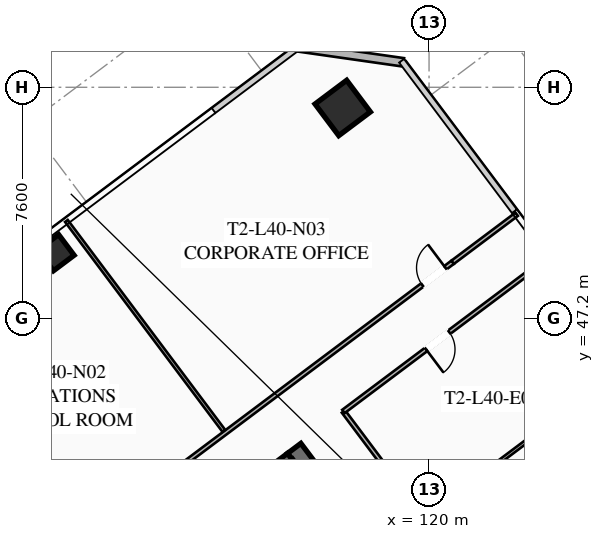
"""IFC4 building model, lengths in metres.
Left out: names, types, materials, properties, quantities, classifications, styles, units other than length and angle.
Written with IfcOpenShell. Run it as: python <this file> out.ifc"""

import sys

from ifc_helpers import new_model, si_unit, direction, frame, frame_2d, origin, origin_2d, place, context, subcontext, project, spatial, rectangle, hollow_rectangle, extrude, element, fill, save


model = new_model("IFC4")
c1 = context("Model", 3, precision=1e-05, world=origin(), true_north=direction((0.0, 1.0)))
c2 = subcontext(c1, "Body", "Model", "MODEL_VIEW")
j1 = project(units=[si_unit("LENGTHUNIT", "METRE"), si_unit("PLANEANGLEUNIT", "RADIAN")], contexts=[c1])
p1 = place(None, origin())
s1 = spatial("IfcSite", under=j1, at=p1, CompositionType="ELEMENT")
p2 = place(p1, origin())
s2 = spatial("IfcBuilding", under=s1, at=p2, CompositionType="ELEMENT")
p3 = place(p2, frame((0.0, 0.0, 149.9)))
s3 = spatial("IfcBuildingStorey", under=s2, at=p3, CompositionType="ELEMENT", Elevation=149.9)
p4 = place(p3, frame((115.564, 42.923, 0.0), z_axis=(0.0, 0.0, 1.0), x_axis=(0.600005007985, -0.799996243986, 0.0)))
e1 = element("IfcWall", 1, at=p4, inside=s3, PredefinedType="SHEAR", context=c2, shape_type="SweptSolid", body=[
    extrude(rectangle(XDim=15.6, YDim=0.55, at=frame_2d((7.8, 0.0))), origin(), (0.0, 0.0, 1.0), 3.55),
])
p5 = place(p3, frame((103.461, 33.502, 0.0), z_axis=(0.0, 0.0, 1.0), x_axis=(0.799998054672, 0.600002593761, 0.0)))
e2 = element("IfcWall", 2, at=p5, inside=s3, PredefinedType="SHEAR", context=c2, shape_type="SweptSolid", body=[
    extrude(rectangle(XDim=15.06, YDim=0.55, at=frame_2d((7.53, 0.0))), origin(), (0.0, 0.0, 1.0), 3.55),
])
p6 = place(p5, frame((4.58, 0.0, 0.0)))
e3 = element("IfcOpeningElement", 3, at=p6, cuts=e2, PredefinedType="OPENING", context=c2, shape_type="SweptSolid", body=[
    extrude(rectangle(XDim=1.25, YDim=2.25, at=frame_2d((0.625, 1.125))), frame((0.0, 0.285, 0.0), z_axis=(0.0, -1.0, 0.0), x_axis=(1.0, 0.0, 0.0)), (0.0, 0.0, 1.0), 0.57),
])
p7 = place(p5, frame((9.63, 0.0, 0.0)))
e4 = element("IfcOpeningElement", 4, at=p7, cuts=e2, PredefinedType="OPENING", context=c2, shape_type="SweptSolid", body=[
    extrude(rectangle(XDim=1.25, YDim=2.25, at=frame_2d((0.625, 1.125))), frame((0.0, 0.285, 0.0), z_axis=(0.0, -1.0, 0.0), x_axis=(1.0, 0.0, 0.0)), (0.0, 0.0, 1.0), 0.57),
])
p8 = place(p3, frame((115.41, 41.87, 0.0), z_axis=(0.0, 0.0, 1.0), x_axis=(0.799999996291, 0.600000004945, 0.0)))
e5 = element("IfcColumn", 5, at=p8, inside=s3, PredefinedType="COLUMN", context=c2, shape_type="SweptSolid", body=[
    extrude(hollow_rectangle(XDim=1.0, YDim=1.0, WallThickness=0.04, at=origin_2d()), origin(), (0.0, 0.0, 1.0), 3.37),
])
p9 = place(p3, frame((117.16, 54.12, 0.0), z_axis=(0.0, 0.0, 1.0), x_axis=(0.799999996291, 0.600000004945, 0.0)))
e6 = element("IfcColumn", 6, at=p9, inside=s3, PredefinedType="COLUMN", context=c2, shape_type="SweptSolid", body=[
    extrude(hollow_rectangle(XDim=1.3, YDim=1.3, WallThickness=0.05, at=origin_2d()), origin(), (0.0, 0.0, 1.0), 3.37),
])
p10 = place(p3, frame((107.73, 49.36, 0.0), z_axis=(0.0, 0.0, 1.0), x_axis=(0.799999996291, 0.600000004945, 0.0)))
e7 = element("IfcColumn", 7, at=p10, inside=s3, PredefinedType="COLUMN", context=c2, shape_type="SweptSolid", body=[
    extrude(hollow_rectangle(XDim=0.85, YDim=0.85, WallThickness=0.035, at=origin_2d()), origin(), (0.0, 0.0, 1.0), 3.37),
])
p11 = place(p3, frame((115.66, 56.12, 0.0), z_axis=(0.0, 0.0, 1.0), x_axis=(0.989949493661, -0.141421356237, 0.0)))
e8 = element("IfcWall", 8, at=p11, inside=s3, PredefinedType="SOLIDWALL", context=c2, shape_type="SweptSolid", body=[
    extrude(rectangle(XDim=3.536, YDim=0.28, at=frame_2d((1.768, 0.0))), origin(), (0.0, 0.0, 1.0), 3.37),
])
p12 = place(p3, frame((119.824, 40.618, 0.0), z_axis=(0.0, 0.0, 1.0), x_axis=(-0.599982243973, 0.800013316712, 0.0)))
e9 = element("IfcWall", 9, at=p12, inside=s3, PredefinedType="PARTITIONING", context=c2, shape_type="SweptSolid", body=[
    extrude(rectangle(XDim=4.4, YDim=0.135, at=frame_2d((2.2, 0.0))), origin(), (0.0, 0.0, 1.0), 2.723),
])
p13 = place(p3, frame((95.738, 30.266, 0.0), z_axis=(0.0, 0.0, 1.0), x_axis=(0.800003744006, 0.59999500796, 0.0)))
e10 = element("IfcWall", 10, at=p13, inside=s3, PredefinedType="PARTITIONING", context=c2, shape_type="SweptSolid", body=[
    extrude(rectangle(XDim=31.3, YDim=0.135, at=frame_2d((15.65, 0.0))), origin(), (0.0, 0.0, 1.0), 2.723),
])
p14 = place(p13, frame((0.3, 0.0, 0.0)))
e11 = element("IfcOpeningElement", 11, at=p14, cuts=e10, PredefinedType="OPENING", context=c2, shape_type="SweptSolid", body=[
    extrude(rectangle(XDim=0.95, YDim=2.05, at=frame_2d((0.475, 1.025))), frame((0.0, 0.077, 0.0), z_axis=(0.0, -1.0, 0.0), x_axis=(1.0, 0.0, 0.0)), (0.0, 0.0, 1.0), 0.155),
])
p15 = place(p13, frame((15.493, 0.0, 0.0)))
e12 = element("IfcOpeningElement", 12, at=p15, cuts=e10, PredefinedType="OPENING", context=c2, shape_type="SweptSolid", body=[
    extrude(rectangle(XDim=0.95, YDim=2.05, at=frame_2d((0.475, 1.025))), frame((0.0, 0.077, 0.0), z_axis=(0.0, -1.0, 0.0), x_axis=(1.0, 0.0, 0.0)), (0.0, 0.0, 1.0), 0.155),
])
p16 = place(p13, frame((30.05, 0.0, 0.0)))
e13 = element("IfcOpeningElement", 13, at=p16, cuts=e10, PredefinedType="OPENING", context=c2, shape_type="SweptSolid", body=[
    extrude(rectangle(XDim=0.95, YDim=2.05, at=frame_2d((0.475, 1.025))), frame((0.0, 0.077, 0.0), z_axis=(0.0, -1.0, 0.0), x_axis=(1.0, 0.0, 0.0)), (0.0, 0.0, 1.0), 0.155),
])
p17 = place(p3, frame((120.778, 49.046, 0.0), z_axis=(0.0, 0.0, 1.0), x_axis=(0.799977721118, 0.600029704027, 0.0)))
e14 = element("IfcWall", 14, at=p17, inside=s3, PredefinedType="PARTITIONING", context=c2, shape_type="SweptSolid", body=[
    extrude(rectangle(XDim=2.63, YDim=0.135, at=frame_2d((1.315, 0.0))), origin(), (0.0, 0.0, 1.0), 2.723),
])
p18 = place(p3, frame((113.25, 43.5, 0.0), z_axis=(0.0, 0.0, 1.0), x_axis=(-0.599995473644, 0.800003394747, 0.0)))
e15 = element("IfcWall", 15, at=p18, inside=s3, PredefinedType="PARTITIONING", context=c2, shape_type="SweptSolid", body=[
    extrude(rectangle(XDim=8.63, YDim=0.11, at=frame_2d((4.315, 0.0))), origin(), (0.0, 0.0, 1.0), 2.723),
])
p19 = place(p3, frame((123.824, 49.118, 0.0), z_axis=(0.0, 0.0, 1.0), x_axis=(-0.799996470201, -0.60000470637, 0.0)))
e16 = element("IfcWall", 16, at=p19, inside=s3, PredefinedType="PARTITIONING", context=c2, shape_type="SweptSolid", body=[
    extrude(rectangle(XDim=8.3, YDim=0.135, at=frame_2d((4.15, 0.0))), origin(), (0.0, 0.0, 1.0), 2.723),
])
p20 = place(p19, frame((3.95, 0.0, 0.0)))
e17 = element("IfcOpeningElement", 17, at=p20, cuts=e16, PredefinedType="OPENING", context=c2, shape_type="SweptSolid", body=[
    extrude(rectangle(XDim=0.95, YDim=2.05, at=frame_2d((0.475, 1.025))), frame((0.0, 0.077, 0.0), z_axis=(0.0, -1.0, 0.0), x_axis=(1.0, 0.0, 0.0)), (0.0, 0.0, 1.0), 0.155),
])
p21 = place(p3, frame((126.464, 45.598, 0.0), z_axis=(0.0, 0.0, 1.0), x_axis=(-0.8000181681, -0.599975775102, 0.0)))
e18 = element("IfcWall", 18, at=p21, inside=s3, PredefinedType="PARTITIONING", context=c2, shape_type="SweptSolid", body=[
    extrude(rectangle(XDim=6.45, YDim=0.11, at=frame_2d((3.225, 0.0))), origin(), (0.0, 0.0, 1.0), 2.723),
])
p22 = place(p16, origin())
e19 = element("IfcDoor", 19, at=p22, inside=s3, OperationType="SINGLE_SWING_RIGHT", PredefinedType="DOOR", context=c2, shape_type="SweptSolid", body=[
    extrude(rectangle(XDim=0.95, YDim=2.05, at=frame_2d((0.475, 1.025))), frame((0.0, 0.025, 0.0), z_axis=(0.0, -1.0, 0.0), x_axis=(1.0, 0.0, 0.0)), (0.0, 0.0, 1.0), 0.05),
])
fill(e13, e19)
p23 = place(p20, origin())
e20 = element("IfcDoor", 20, at=p23, inside=s3, OperationType="SINGLE_SWING_RIGHT", PredefinedType="DOOR", context=c2, shape_type="SweptSolid", body=[
    extrude(rectangle(XDim=0.95, YDim=2.05, at=frame_2d((0.475, 1.025))), frame((0.0, 0.025, 0.0), z_axis=(0.0, -1.0, 0.0), x_axis=(1.0, 0.0, 0.0)), (0.0, 0.0, 1.0), 0.05),
])
fill(e17, e20)
save(model, sys.argv[1])
